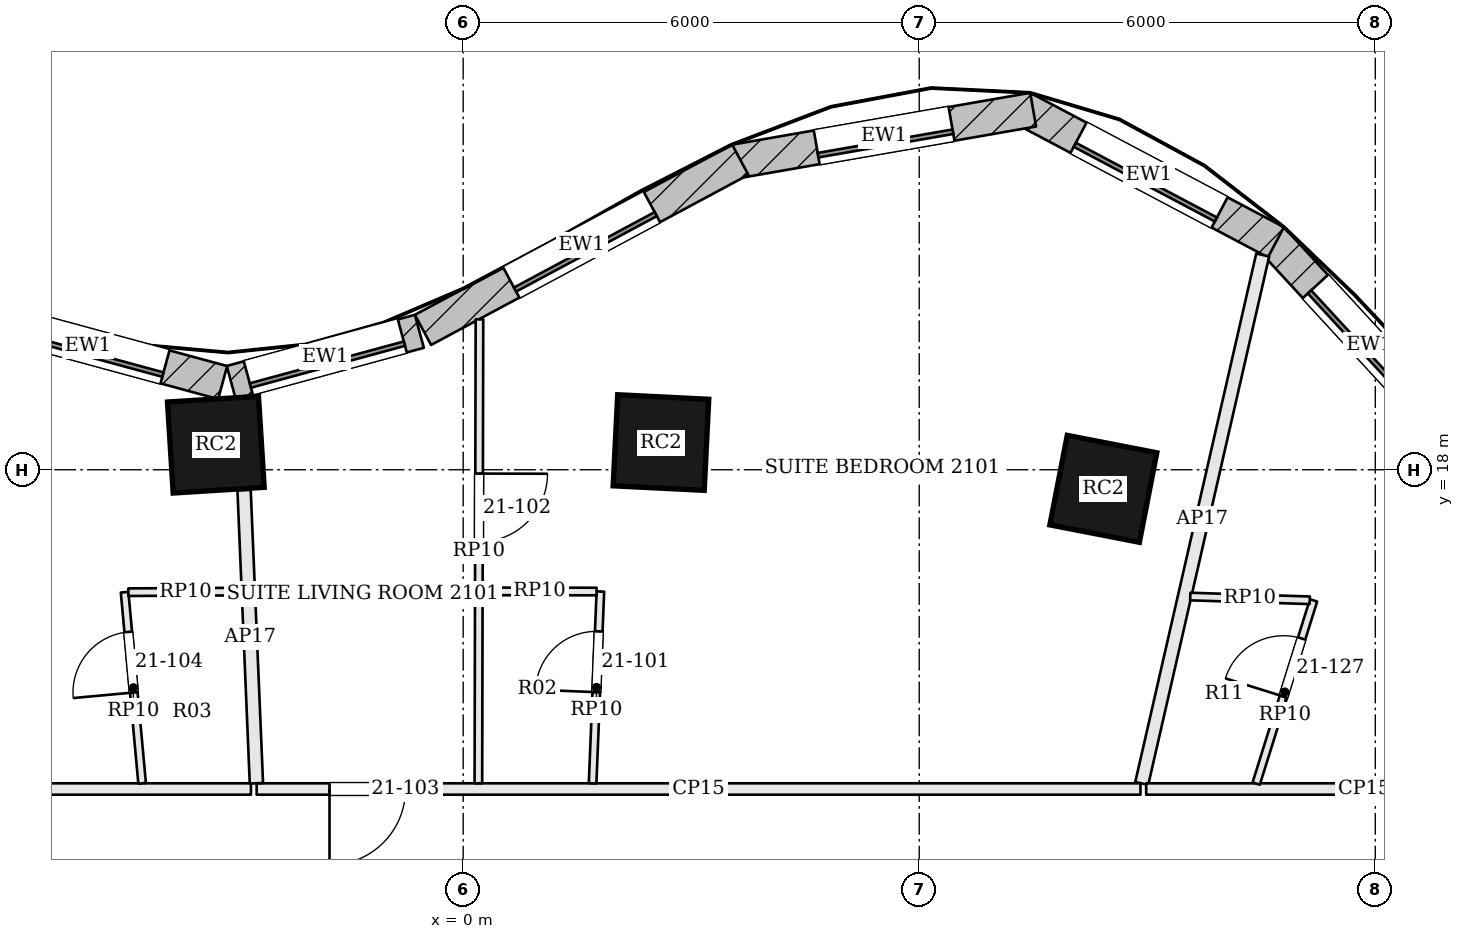
"""IFC4 building model, lengths in metres.
Left out: names, types, materials, properties, quantities, classifications, styles, units other than length and angle.
Written with IfcOpenShell. Run it as: python <this file> out.ifc"""

import sys

from ifc_helpers import new_model, si_unit, direction, frame, frame_2d, origin, origin_2d, place, context, subcontext, project, spatial, rectangle, extrude, element, fill, save


model = new_model("IFC4")
c1 = context("Model", 3, precision=1e-05, world=origin(), true_north=direction((0.0, 1.0)))
c2 = subcontext(c1, "Body", "Model", "MODEL_VIEW")
j1 = project(units=[si_unit("LENGTHUNIT", "METRE"), si_unit("PLANEANGLEUNIT", "RADIAN")], contexts=[c1])
p1 = place(None, origin())
s1 = spatial("IfcSite", under=j1, at=p1, CompositionType="ELEMENT")
p2 = place(p1, origin())
s2 = spatial("IfcBuilding", under=s1, at=p2, CompositionType="ELEMENT")
p3 = place(p2, frame((0.0, 0.0, 92.4)))
s3 = spatial("IfcBuildingStorey", under=s2, at=p3, CompositionType="ELEMENT", Elevation=92.4)
for number, where, z_axis, x_axis in (
    (1, (8.422, 17.749, 0.0), (0.0, 0.0, 1.0), (-0.982, 0.191, 0.0)),
    (2, (2.602, 18.358, 0.0), (0.0, 0.0, 1.0), (-0.999, 0.05, 0.0)),
    (3, (-3.254, 18.33, 0.0), (0.0, 0.0, 1.0), (-0.998, -0.063, 0.0)),
):
    element("IfcColumn", number, at=place(p3, frame(where, z_axis=z_axis, x_axis=x_axis)), inside=s3, PredefinedType="COLUMN", context=c2, shape_type="SweptSolid", body=[
        extrude(rectangle(XDim=1.2, YDim=1.2, at=origin_2d()), origin(), (0.0, 0.0, 1.0), 3.6),
    ])
p4 = place(p3, frame((13.209, 18.243, 0.0), z_axis=(0.0, 0.0, 1.0), x_axis=(-0.677612152497, 0.735419452278, 0.0)))
e4 = element("IfcWall", 4, at=p4, inside=s3, PredefinedType="SOLIDWALL", context=c2, shape_type="SweptSolid", body=[
    extrude(rectangle(XDim=3.797, YDim=0.45, at=frame_2d((1.898, 0.0))), origin(), (0.0, 0.0, 1.0), 3.4),
])
p5 = place(p4, frame((0.848, 0.0, 0.9)))
e5 = element("IfcOpeningElement", 5, at=p5, cuts=e4, PredefinedType="OPENING", context=c2, shape_type="SweptSolid", body=[
    extrude(rectangle(XDim=2.1, YDim=2.0, at=frame_2d((1.05, 1.0))), frame((0.0, 0.235, 0.0), z_axis=(0.0, -1.0, 0.0), x_axis=(1.0, 0.0, 0.0)), (0.0, 0.0, 1.0), 0.47),
])
p6 = place(p3, frame((10.693, 20.993, 0.0), z_axis=(0.0, 0.0, 1.0), x_axis=(-0.883817790726, 0.46783128668, 0.0)))
e6 = element("IfcWall", 6, at=p6, inside=s3, PredefinedType="SOLIDWALL", context=c2, shape_type="SweptSolid", body=[
    extrude(rectangle(XDim=3.777, YDim=0.45, at=frame_2d((1.888, 0.0))), origin(), (0.0, 0.0, 1.0), 3.4),
])
p7 = place(p6, frame((0.838, 0.0, 0.9)))
e7 = element("IfcOpeningElement", 7, at=p7, cuts=e6, PredefinedType="OPENING", context=c2, shape_type="SweptSolid", body=[
    extrude(rectangle(XDim=2.1, YDim=2.0, at=frame_2d((1.05, 1.0))), frame((0.0, 0.235, 0.0), z_axis=(0.0, -1.0, 0.0), x_axis=(1.0, 0.0, 0.0)), (0.0, 0.0, 1.0), 0.47),
])
p8 = place(p3, frame((7.499, 22.737, 0.0), z_axis=(0.0, 0.0, 1.0), x_axis=(-0.98521220506, -0.171338585849, 0.0)))
e8 = element("IfcWall", 8, at=p8, inside=s3, PredefinedType="SOLIDWALL", context=c2, shape_type="SweptSolid", body=[
    extrude(rectangle(XDim=3.98, YDim=0.45, at=frame_2d((1.99, 0.0))), origin(), (0.0, 0.0, 1.0), 3.4),
])
p9 = place(p8, frame((1.09, 0.0, 0.9)))
e9 = element("IfcOpeningElement", 9, at=p9, cuts=e8, PredefinedType="OPENING", context=c2, shape_type="SweptSolid", body=[
    extrude(rectangle(XDim=1.8, YDim=2.0, at=frame_2d((0.9, 1.0))), frame((0.0, 0.235, 0.0), z_axis=(0.0, -1.0, 0.0), x_axis=(1.0, 0.0, 0.0)), (0.0, 0.0, 1.0), 0.47),
])
p10 = place(p3, frame((3.646, 22.079, 0.0), z_axis=(0.0, 0.0, 1.0), x_axis=(-0.881279133897, -0.472596115259, 0.0)))
e10 = element("IfcWall", 10, at=p10, inside=s3, PredefinedType="SOLIDWALL", context=c2, shape_type="SweptSolid", body=[
    extrude(rectangle(XDim=4.737, YDim=0.45, at=frame_2d((2.368, 0.0))), origin(), (0.0, 0.0, 1.0), 3.4),
])
p11 = place(p10, frame((1.318, 0.0, 0.9)))
e11 = element("IfcOpeningElement", 11, at=p11, cuts=e10, PredefinedType="OPENING", context=c2, shape_type="SweptSolid", body=[
    extrude(rectangle(XDim=2.1, YDim=2.0, at=frame_2d((1.05, 1.0))), frame((0.0, 0.235, 0.0), z_axis=(0.0, -1.0, 0.0), x_axis=(1.0, 0.0, 0.0)), (0.0, 0.0, 1.0), 0.47),
])
p12 = place(p3, frame((-0.576, 19.821, 0.0), z_axis=(0.0, 0.0, 1.0), x_axis=(-0.965009398019, -0.262215296532, 0.0)))
e12 = element("IfcWall", 12, at=p12, inside=s3, PredefinedType="SOLIDWALL", context=c2, shape_type="SweptSolid", body=[
    extrude(rectangle(XDim=2.565, YDim=0.45, at=frame_2d((1.283, 0.0))), origin(), (0.0, 0.0, 1.0), 3.4),
])
p13 = place(p12, frame((0.233, 0.0, 0.9)))
e13 = element("IfcOpeningElement", 13, at=p13, cuts=e12, PredefinedType="OPENING", context=c2, shape_type="SweptSolid", body=[
    extrude(rectangle(XDim=2.1, YDim=2.0, at=frame_2d((1.05, 1.0))), frame((0.0, 0.235, 0.0), z_axis=(0.0, -1.0, 0.0), x_axis=(1.0, 0.0, 0.0)), (0.0, 0.0, 1.0), 0.47),
])
p14 = place(p3, frame((-3.164, 19.147, 0.0), z_axis=(0.0, 0.0, 1.0), x_axis=(-0.965039479998, 0.262104563191, 0.0)))
e14 = element("IfcWall", 14, at=p14, inside=s3, PredefinedType="SOLIDWALL", context=c2, shape_type="SweptSolid", body=[
    extrude(rectangle(XDim=3.672, YDim=0.45, at=frame_2d((1.836, 0.0))), origin(), (0.0, 0.0, 1.0), 3.4),
])
p15 = place(p14, frame((0.786, 0.0, 0.9)))
e15 = element("IfcOpeningElement", 15, at=p15, cuts=e14, PredefinedType="OPENING", context=c2, shape_type="SweptSolid", body=[
    extrude(rectangle(XDim=2.1, YDim=2.0, at=frame_2d((1.05, 1.0))), frame((0.0, 0.235, 0.0), z_axis=(0.0, -1.0, 0.0), x_axis=(1.0, 0.0, 0.0)), (0.0, 0.0, 1.0), 0.47),
])
p16 = place(p3, frame((8.911, 13.8, 0.0), z_axis=(0.0, 0.0, 1.0), x_axis=(-1.0, 0.0, 0.0)))
e16 = element("IfcWall", 16, at=p16, inside=s3, PredefinedType="PARTITIONING", context=c2, shape_type="SweptSolid", body=[
    extrude(rectangle(XDim=11.628, YDim=0.15, at=frame_2d((5.814, 0.0))), origin(), (0.0, 0.0, 1.0), 2.784),
])
p17 = place(p16, frame((9.669, 0.0, 0.0)))
e17 = element("IfcOpeningElement", 17, at=p17, cuts=e16, PredefinedType="OPENING", context=c2, shape_type="SweptSolid", body=[
    extrude(rectangle(XDim=1.0, YDim=2.1, at=frame_2d((0.5, 1.05))), frame((0.0, 0.085, 0.0), z_axis=(0.0, -1.0, 0.0), x_axis=(1.0, 0.0, 0.0)), (0.0, 0.0, 1.0), 0.17),
])
p18 = place(p3, frame((10.519, 20.825, 0.0), z_axis=(0.0, 0.0, 1.0), x_axis=(-0.223124088509, -0.974790049768, 0.0)))
e18 = element("IfcWall", 18, at=p18, inside=s3, PredefinedType="PARTITIONING", context=c2, shape_type="SweptSolid", body=[
    extrude(rectangle(XDim=7.132, YDim=0.175, at=frame_2d((3.566, 0.0))), origin(), (0.0, 0.0, 1.0), 2.784),
])
p19 = place(p3, frame((-2.882, 17.732, 0.0), z_axis=(0.0, 0.0, 1.0), x_axis=(0.04199090748, -0.999117992876, 0.0)))
e19 = element("IfcWall", 19, at=p19, inside=s3, PredefinedType="PARTITIONING", context=c2, shape_type="SweptSolid", body=[
    extrude(rectangle(XDim=3.861, YDim=0.175, at=frame_2d((1.93, 0.0))), origin(), (0.0, 0.0, 1.0), 2.784),
])
p20 = place(p3, frame((-2.792, 13.8, 0.0), z_axis=(0.0, 0.0, 1.0), x_axis=(-1.0, 0.0, 0.0)))
e20 = element("IfcWall", 20, at=p20, inside=s3, PredefinedType="PARTITIONING", context=c2, shape_type="SweptSolid", body=[
    extrude(rectangle(XDim=12.008, YDim=0.15, at=frame_2d((6.004, 0.0))), origin(), (0.0, 0.0, 1.0), 2.784),
])
p21 = place(p20, frame((6.771, 0.0, 0.0)))
e21 = element("IfcOpeningElement", 21, at=p21, cuts=e20, PredefinedType="OPENING", context=c2, shape_type="SweptSolid", body=[
    extrude(rectangle(XDim=0.9, YDim=2.4, at=frame_2d((0.45, 1.2))), frame((0.0, 0.085, 0.0), z_axis=(0.0, -1.0, 0.0), x_axis=(1.0, 0.0, 0.0)), (0.0, 0.0, 1.0), 0.17),
])
p22 = place(p3, frame((14.725, 13.8, 0.0), z_axis=(0.0, 0.0, 1.0), x_axis=(-1.0, 0.0, 0.0)))
e22 = element("IfcWall", 22, at=p22, inside=s3, PredefinedType="PARTITIONING", context=c2, shape_type="SweptSolid", body=[
    extrude(rectangle(XDim=5.74, YDim=0.15, at=frame_2d((2.87, 0.0))), origin(), (0.0, 0.0, 1.0), 2.784),
])
p23 = place(p3, frame((0.214, 19.979, 0.0), z_axis=(0.0, 0.0, 1.0), x_axis=(-0.002359899032, -0.999997215434, 0.0)))
e23 = element("IfcWall", 23, at=p23, inside=s3, PredefinedType="PARTITIONING", context=c2, shape_type="SweptSolid", body=[
    extrude(rectangle(XDim=6.104, YDim=0.1, at=frame_2d((3.052, 0.0))), origin(), (0.0, 0.0, 1.0), 2.884),
])
p24 = place(p23, frame((2.029, 0.0, 0.0)))
e24 = element("IfcOpeningElement", 24, at=p24, cuts=e23, PredefinedType="OPENING", context=c2, shape_type="SweptSolid", body=[
    extrude(rectangle(XDim=0.9, YDim=2.4, at=frame_2d((0.45, 1.2))), frame((0.0, 0.06, 0.0), z_axis=(0.0, -1.0, 0.0), x_axis=(1.0, 0.0, 0.0)), (0.0, 0.0, 1.0), 0.12),
])
p25 = place(p3, frame((1.703, 13.875, 0.0), z_axis=(0.0, 0.0, 1.0), x_axis=(0.040512484472, 0.999179032307, 0.0)))
e25 = element("IfcWall", 25, at=p25, inside=s3, PredefinedType="PARTITIONING", context=c2, shape_type="SweptSolid", body=[
    extrude(rectangle(XDim=2.525, YDim=0.1, at=frame_2d((1.262, 0.0))), origin(), (0.0, 0.0, 1.0), 2.884),
])
p26 = place(p25, frame((1.2, 0.0, 0.0)))
e26 = element("IfcOpeningElement", 26, at=p26, cuts=e25, PredefinedType="OPENING", context=c2, shape_type="SweptSolid", body=[
    extrude(rectangle(XDim=0.8, YDim=2.1, at=frame_2d((0.4, 1.05))), frame((0.0, 0.06, 0.0), z_axis=(0.0, -1.0, 0.0), x_axis=(1.0, 0.0, 0.0)), (0.0, 0.0, 1.0), 0.12),
])
p27 = place(p3, frame((1.755, 16.398, 0.0), z_axis=(0.0, 0.0, 1.0), x_axis=(-0.999999151462, 0.001302718321, 0.0)))
e27 = element("IfcWall", 27, at=p27, inside=s3, PredefinedType="PARTITIONING", context=c2, shape_type="SweptSolid", body=[
    extrude(rectangle(XDim=1.499, YDim=0.1, at=frame_2d((0.75, 0.0))), origin(), (0.0, 0.0, 1.0), 2.884),
])
p28 = place(p3, frame((-4.224, 13.875, 0.0), z_axis=(0.0, 0.0, 1.0), x_axis=(-0.09127675815, 0.995825563752, 0.0)))
e28 = element("IfcWall", 28, at=p28, inside=s3, PredefinedType="PARTITIONING", context=c2, shape_type="SweptSolid", body=[
    extrude(rectangle(XDim=2.525, YDim=0.1, at=frame_2d((1.262, 0.0))), origin(), (0.0, 0.0, 1.0), 2.884),
])
p29 = place(p28, frame((1.2, 0.0, 0.0)))
e29 = element("IfcOpeningElement", 29, at=p29, cuts=e28, PredefinedType="OPENING", context=c2, shape_type="SweptSolid", body=[
    extrude(rectangle(XDim=0.8, YDim=2.1, at=frame_2d((0.4, 1.05))), frame((0.0, 0.06, 0.0), z_axis=(0.0, -1.0, 0.0), x_axis=(1.0, 0.0, 0.0)), (0.0, 0.0, 1.0), 0.12),
])
p30 = place(p3, frame((-4.404, 16.389, 0.0), z_axis=(0.0, 0.0, 1.0), x_axis=(0.999986489733, 0.005198110408, 0.0)))
e30 = element("IfcWall", 30, at=p30, inside=s3, PredefinedType="PARTITIONING", context=c2, shape_type="SweptSolid", body=[
    extrude(rectangle(XDim=1.503, YDim=0.1, at=frame_2d((0.751, 0.0))), origin(), (0.0, 0.0, 1.0), 2.884),
])
p31 = place(p3, frame((10.433, 13.872, 0.0), z_axis=(0.0, 0.0, 1.0), x_axis=(0.298770443437, 0.954325008647, 0.0)))
e31 = element("IfcWall", 31, at=p31, inside=s3, PredefinedType="PARTITIONING", context=c2, shape_type="SweptSolid", body=[
    extrude(rectangle(XDim=2.525, YDim=0.1, at=frame_2d((1.262, 0.0))), origin(), (0.0, 0.0, 1.0), 2.884),
])
p32 = place(p31, frame((1.2, 0.0, 0.0)))
e32 = element("IfcOpeningElement", 32, at=p32, cuts=e31, PredefinedType="OPENING", context=c2, shape_type="SweptSolid", body=[
    extrude(rectangle(XDim=0.8, YDim=2.1, at=frame_2d((0.4, 1.05))), frame((0.0, 0.06, 0.0), z_axis=(0.0, -1.0, 0.0), x_axis=(1.0, 0.0, 0.0)), (0.0, 0.0, 1.0), 0.12),
])
p33 = place(p3, frame((11.138, 16.283, 0.0), z_axis=(0.0, 0.0, 1.0), x_axis=(-0.99950813006, 0.031360770779, 0.0)))
e33 = element("IfcWall", 33, at=p33, inside=s3, PredefinedType="PARTITIONING", context=c2, shape_type="SweptSolid", body=[
    extrude(rectangle(XDim=1.573, YDim=0.1, at=frame_2d((0.786, 0.0))), origin(), (0.0, 0.0, 1.0), 2.884),
])
p34 = place(p5, origin())
e34 = element("IfcWindow", 34, at=p34, inside=s3, PartitioningType="SINGLE_PANEL", PredefinedType="WINDOW", context=c2, shape_type="SweptSolid", body=[
    extrude(rectangle(XDim=2.1, YDim=2.0, at=frame_2d((1.05, 1.0))), frame((0.0, 0.135, 0.0), z_axis=(0.0, -1.0, 0.0), x_axis=(1.0, 0.0, 0.0)), (0.0, 0.0, 1.0), 0.06),
])
fill(e5, e34)
p35 = place(p7, origin())
e35 = element("IfcWindow", 35, at=p35, inside=s3, PartitioningType="SINGLE_PANEL", PredefinedType="WINDOW", context=c2, shape_type="SweptSolid", body=[
    extrude(rectangle(XDim=2.1, YDim=2.0, at=frame_2d((1.05, 1.0))), frame((0.0, 0.135, 0.0), z_axis=(0.0, -1.0, 0.0), x_axis=(1.0, 0.0, 0.0)), (0.0, 0.0, 1.0), 0.06),
])
fill(e7, e35)
p36 = place(p9, origin())
e36 = element("IfcWindow", 36, at=p36, inside=s3, PartitioningType="SINGLE_PANEL", PredefinedType="WINDOW", context=c2, shape_type="SweptSolid", body=[
    extrude(rectangle(XDim=1.8, YDim=2.0, at=frame_2d((0.9, 1.0))), frame((0.0, 0.135, 0.0), z_axis=(0.0, -1.0, 0.0), x_axis=(1.0, 0.0, 0.0)), (0.0, 0.0, 1.0), 0.06),
])
fill(e9, e36)
p37 = place(p11, origin())
e37 = element("IfcWindow", 37, at=p37, inside=s3, PartitioningType="SINGLE_PANEL", PredefinedType="WINDOW", context=c2, shape_type="SweptSolid", body=[
    extrude(rectangle(XDim=2.1, YDim=2.0, at=frame_2d((1.05, 1.0))), frame((0.0, 0.135, 0.0), z_axis=(0.0, -1.0, 0.0), x_axis=(1.0, 0.0, 0.0)), (0.0, 0.0, 1.0), 0.06),
])
fill(e11, e37)
p38 = place(p13, origin())
e38 = element("IfcWindow", 38, at=p38, inside=s3, PartitioningType="SINGLE_PANEL", PredefinedType="WINDOW", context=c2, shape_type="SweptSolid", body=[
    extrude(rectangle(XDim=2.1, YDim=2.0, at=frame_2d((1.05, 1.0))), frame((0.0, 0.135, 0.0), z_axis=(0.0, -1.0, 0.0), x_axis=(1.0, 0.0, 0.0)), (0.0, 0.0, 1.0), 0.06),
])
fill(e13, e38)
p39 = place(p15, origin())
e39 = element("IfcWindow", 39, at=p39, inside=s3, PartitioningType="SINGLE_PANEL", PredefinedType="WINDOW", context=c2, shape_type="SweptSolid", body=[
    extrude(rectangle(XDim=2.1, YDim=2.0, at=frame_2d((1.05, 1.0))), frame((0.0, 0.135, 0.0), z_axis=(0.0, -1.0, 0.0), x_axis=(1.0, 0.0, 0.0)), (0.0, 0.0, 1.0), 0.06),
])
fill(e15, e39)
p40 = place(p26, origin())
e40 = element("IfcDoor", 40, at=p40, inside=s3, OperationType="SINGLE_SWING_LEFT", PredefinedType="DOOR", context=c2, shape_type="SweptSolid", body=[
    extrude(rectangle(XDim=0.8, YDim=2.1, at=frame_2d((0.4, 1.05))), frame((0.0, 0.025, 0.0), z_axis=(0.0, -1.0, 0.0), x_axis=(1.0, 0.0, 0.0)), (0.0, 0.0, 1.0), 0.05),
])
fill(e26, e40)
p41 = place(p24, origin())
e41 = element("IfcDoor", 41, at=p41, inside=s3, OperationType="SINGLE_SWING_LEFT", PredefinedType="DOOR", context=c2, shape_type="SweptSolid", body=[
    extrude(rectangle(XDim=0.9, YDim=2.4, at=frame_2d((0.45, 1.2))), frame((0.0, 0.025, 0.0), z_axis=(0.0, -1.0, 0.0), x_axis=(1.0, 0.0, 0.0)), (0.0, 0.0, 1.0), 0.05),
])
fill(e24, e41)
p42 = place(p17, origin())
e42 = element("IfcDoor", 42, at=p42, inside=s3, OperationType="SINGLE_SWING_RIGHT", PredefinedType="DOOR", context=c2, shape_type="SweptSolid", body=[
    extrude(rectangle(XDim=1.0, YDim=2.1, at=frame_2d((0.5, 1.05))), frame((0.0, 0.025, 0.0), z_axis=(0.0, -1.0, 0.0), x_axis=(1.0, 0.0, 0.0)), (0.0, 0.0, 1.0), 0.05),
])
fill(e17, e42)
p43 = place(p29, origin())
e43 = element("IfcDoor", 43, at=p43, inside=s3, OperationType="SINGLE_SWING_LEFT", PredefinedType="DOOR", context=c2, shape_type="SweptSolid", body=[
    extrude(rectangle(XDim=0.8, YDim=2.1, at=frame_2d((0.4, 1.05))), frame((0.0, 0.025, 0.0), z_axis=(0.0, -1.0, 0.0), x_axis=(1.0, 0.0, 0.0)), (0.0, 0.0, 1.0), 0.05),
])
fill(e29, e43)
p44 = place(p32, origin())
e44 = element("IfcDoor", 44, at=p44, inside=s3, OperationType="SINGLE_SWING_LEFT", PredefinedType="DOOR", context=c2, shape_type="SweptSolid", body=[
    extrude(rectangle(XDim=0.8, YDim=2.1, at=frame_2d((0.4, 1.05))), frame((0.0, 0.025, 0.0), z_axis=(0.0, -1.0, 0.0), x_axis=(1.0, 0.0, 0.0)), (0.0, 0.0, 1.0), 0.05),
])
fill(e32, e44)
save(model, sys.argv[1])
